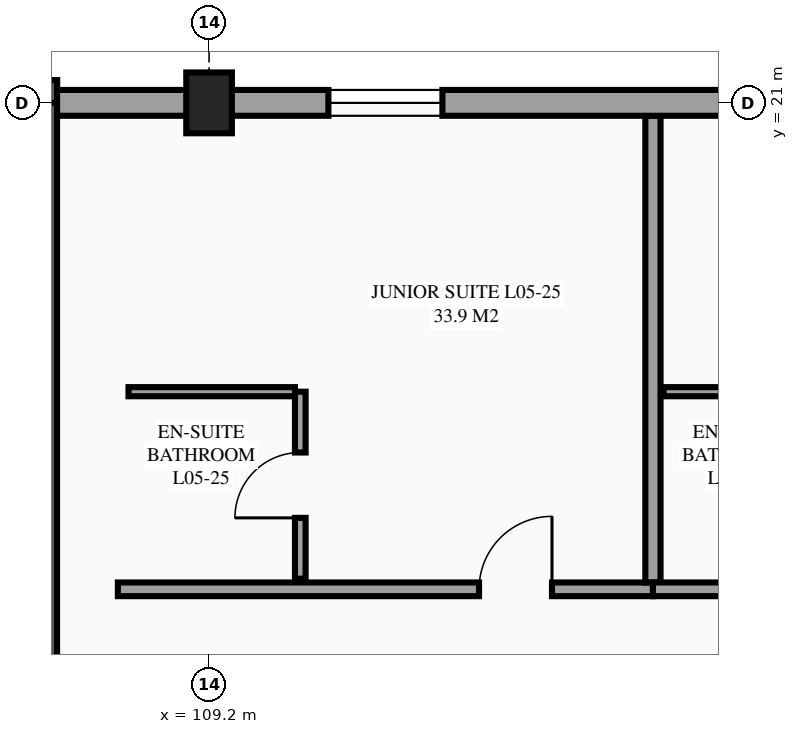
"""IFC4 building model, lengths in metres.
Left out: names, types, materials, properties, quantities, classifications, styles, units other than length and angle.
Written with IfcOpenShell. Run it as: python <this file> out.ifc"""

import sys

from ifc_helpers import new_model, si_unit, direction, frame, frame_2d, origin, origin_2d, place, context, subcontext, project, spatial, rectangle, extrude, element, fill, save


model = new_model("IFC4")
c1 = context("Model", 3, precision=1e-05, world=origin(), true_north=direction((0.0, 1.0)))
c2 = subcontext(c1, "Body", "Model", "MODEL_VIEW")
j1 = project(units=[si_unit("LENGTHUNIT", "METRE"), si_unit("PLANEANGLEUNIT", "RADIAN")], contexts=[c1])
p1 = place(None, origin())
s1 = spatial("IfcSite", under=j1, at=p1, CompositionType="ELEMENT")
p2 = place(p1, origin())
s2 = spatial("IfcBuilding", under=s1, at=p2, CompositionType="ELEMENT")
p3 = place(p2, frame((0.0, 0.0, 21.9)))
s3 = spatial("IfcBuildingStorey", under=s2, at=p3, CompositionType="ELEMENT", Elevation=21.9)
p4 = place(p3, frame((109.2, 21.0, 0.0), z_axis=(0.0, 0.0, 1.0), x_axis=(1.0, 0.0, 0.0)))
e1 = element("IfcColumn", 1, at=p4, inside=s3, PredefinedType="COLUMN", context=c2, shape_type="SweptSolid", body=[
    extrude(rectangle(XDim=0.6, YDim=0.8, at=origin_2d()), origin(), (0.0, 0.0, 1.0), 3.6),
])
p5 = place(p3, frame((107.05, 12.46, 0.0), z_axis=(0.0, 0.0, 1.0), x_axis=(0.0, 1.0, 0.0)))
e2 = element("IfcWall", 2, at=p5, inside=s3, PredefinedType="SHEAR", context=c2, shape_type="SweptSolid", body=[
    extrude(rectangle(XDim=8.84, YDim=0.3, at=frame_2d((4.42, 0.0))), origin(), (0.0, 0.0, 1.0), 3.6),
])
p6 = place(p3, frame((107.2, 21.15, 0.0), z_axis=(0.0, 0.0, 1.0), x_axis=(-1.0, 0.0, 0.0)))
e3 = element("IfcWall", 3, at=p6, inside=s3, PredefinedType="SHEAR", context=c2, shape_type="SweptSolid", body=[
    extrude(rectangle(XDim=5.2, YDim=0.3, at=frame_2d((2.6, 0.0))), origin(), (0.0, 0.0, 1.0), 3.6),
])
p7 = place(p3, frame((108.0, 14.6, 0.0), z_axis=(0.0, 0.0, 1.0), x_axis=(1.0, 0.0, 0.0)))
e4 = element("IfcWall", 4, at=p7, inside=s3, PredefinedType="PARTITIONING", context=c2, shape_type="SweptSolid", body=[
    extrude(rectangle(XDim=7.04, YDim=0.18, at=frame_2d((3.52, 0.0))), origin(), (0.0, 0.0, 1.0), 3.375),
])
p8 = place(p7, frame((4.752, 0.0, 0.0)))
e5 = element("IfcOpeningElement", 5, at=p8, cuts=e4, PredefinedType="OPENING", context=c2, shape_type="SweptSolid", body=[
    extrude(rectangle(XDim=0.96, YDim=2.15, at=frame_2d((0.48, 1.075))), frame((0.0, 0.1, 0.0), z_axis=(0.0, -1.0, 0.0), x_axis=(1.0, 0.0, 0.0)), (0.0, 0.0, 1.0), 0.2),
])
p9 = place(p3, frame((115.04, 14.69, 0.0), z_axis=(0.0, 0.0, 1.0), x_axis=(0.0, 1.0, 0.0)))
e6 = element("IfcWall", 6, at=p9, inside=s3, PredefinedType="PARTITIONING", context=c2, shape_type="SweptSolid", body=[
    extrude(rectangle(XDim=6.14, YDim=0.2, at=frame_2d((3.07, 0.0))), origin(), (0.0, 0.0, 1.0), 3.375),
])
p10 = place(p3, frame((110.4, 14.74, 0.0), z_axis=(0.0, 0.0, 1.0), x_axis=(0.0, 1.0, 0.0)))
e7 = element("IfcWall", 7, at=p10, inside=s3, PredefinedType="PARTITIONING", context=c2, shape_type="SweptSolid", body=[
    extrude(rectangle(XDim=2.46, YDim=0.14, at=frame_2d((1.23, 0.0))), origin(), (0.0, 0.0, 1.0), 3.375),
])
p11 = place(p10, frame((0.8, 0.0, 0.0)))
e8 = element("IfcOpeningElement", 8, at=p11, cuts=e7, PredefinedType="OPENING", context=c2, shape_type="SweptSolid", body=[
    extrude(rectangle(XDim=0.86, YDim=2.1, at=frame_2d((0.43, 1.05))), frame((0.0, 0.08, 0.0), z_axis=(0.0, -1.0, 0.0), x_axis=(1.0, 0.0, 0.0)), (0.0, 0.0, 1.0), 0.16),
])
p12 = place(p3, frame((108.14, 17.2, 0.0), z_axis=(0.0, 0.0, 1.0), x_axis=(1.0, 0.0, 0.0)))
e9 = element("IfcWall", 9, at=p12, inside=s3, PredefinedType="PARTITIONING", context=c2, shape_type="SweptSolid", body=[
    extrude(rectangle(XDim=2.19, YDim=0.12, at=frame_2d((1.095, 0.0))), origin(), (0.0, 0.0, 1.0), 3.375),
])
p13 = place(p3, frame((115.04, 14.6, 0.0), z_axis=(0.0, 0.0, 1.0), x_axis=(1.0, 0.0, 0.0)))
e10 = element("IfcWall", 10, at=p13, inside=s3, PredefinedType="PARTITIONING", context=c2, shape_type="SweptSolid", body=[
    extrude(rectangle(XDim=7.04, YDim=0.18, at=frame_2d((3.52, 0.0))), origin(), (0.0, 0.0, 1.0), 3.375),
])
p14 = place(p13, frame((4.752, 0.0, 0.0)))
e11 = element("IfcOpeningElement", 11, at=p14, cuts=e10, PredefinedType="OPENING", context=c2, shape_type="SweptSolid", body=[
    extrude(rectangle(XDim=0.96, YDim=2.15, at=frame_2d((0.48, 1.075))), frame((0.0, 0.1, 0.0), z_axis=(0.0, -1.0, 0.0), x_axis=(1.0, 0.0, 0.0)), (0.0, 0.0, 1.0), 0.2),
])
p15 = place(p3, frame((115.18, 17.2, 0.0), z_axis=(0.0, 0.0, 1.0), x_axis=(1.0, 0.0, 0.0)))
e12 = element("IfcWall", 12, at=p15, inside=s3, PredefinedType="PARTITIONING", context=c2, shape_type="SweptSolid", body=[
    extrude(rectangle(XDim=2.19, YDim=0.12, at=frame_2d((1.095, 0.0))), origin(), (0.0, 0.0, 1.0), 3.375),
])
p16 = place(p3, frame((117.6, 21.0, 0.0), z_axis=(0.0, 0.0, 1.0), x_axis=(-1.0, 0.0, 0.0)))
e13 = element("IfcWall", 13, at=p16, inside=s3, PredefinedType="STANDARD", context=c2, shape_type="SweptSolid", body=[
    extrude(rectangle(XDim=8.4, YDim=0.34, at=frame_2d((4.2, 0.0))), origin(), (0.0, 0.0, 1.0), 3.075),
])
p17 = place(p16, frame((5.33, 0.0, 0.85)))
e14 = element("IfcOpeningElement", 14, at=p17, cuts=e13, PredefinedType="OPENING", context=c2, shape_type="SweptSolid", body=[
    extrude(rectangle(XDim=1.5, YDim=1.5, at=frame_2d((0.75, 0.75))), frame((0.0, 0.18, 0.0), z_axis=(0.0, -1.0, 0.0), x_axis=(1.0, 0.0, 0.0)), (0.0, 0.0, 1.0), 0.36),
])
p18 = place(p3, frame((109.2, 21.0, 0.0), z_axis=(0.0, 0.0, 1.0), x_axis=(-1.0, 0.0, 0.0)))
e15 = element("IfcWall", 15, at=p18, inside=s3, PredefinedType="STANDARD", context=c2, shape_type="SweptSolid", body=[
    extrude(rectangle(XDim=2.0, YDim=0.34, at=frame_2d((1.0, 0.0))), origin(), (0.0, 0.0, 1.0), 2.48),
])
p19 = place(p17, origin())
e16 = element("IfcWindow", 16, at=p19, inside=s3, PartitioningType="SINGLE_PANEL", PredefinedType="WINDOW", context=c2, shape_type="SweptSolid", body=[
    extrude(rectangle(XDim=1.5, YDim=1.5, at=frame_2d((0.75, 0.75))), frame((0.0, 0.03, 0.0), z_axis=(0.0, -1.0, 0.0), x_axis=(1.0, 0.0, 0.0)), (0.0, 0.0, 1.0), 0.06),
])
fill(e14, e16)
p20 = place(p8, origin())
e17 = element("IfcDoor", 17, at=p20, inside=s3, OperationType="SINGLE_SWING_RIGHT", PredefinedType="DOOR", context=c2, shape_type="SweptSolid", body=[
    extrude(rectangle(XDim=0.96, YDim=2.15, at=frame_2d((0.48, 1.075))), frame((0.0, 0.025, 0.0), z_axis=(0.0, -1.0, 0.0), x_axis=(1.0, 0.0, 0.0)), (0.0, 0.0, 1.0), 0.05),
])
fill(e5, e17)
p21 = place(p11, origin())
e18 = element("IfcDoor", 18, at=p21, inside=s3, OperationType="SINGLE_SWING_LEFT", PredefinedType="DOOR", context=c2, shape_type="SweptSolid", body=[
    extrude(rectangle(XDim=0.86, YDim=2.1, at=frame_2d((0.43, 1.05))), frame((0.0, 0.025, 0.0), z_axis=(0.0, -1.0, 0.0), x_axis=(1.0, 0.0, 0.0)), (0.0, 0.0, 1.0), 0.05),
])
fill(e8, e18)
save(model, sys.argv[1])
